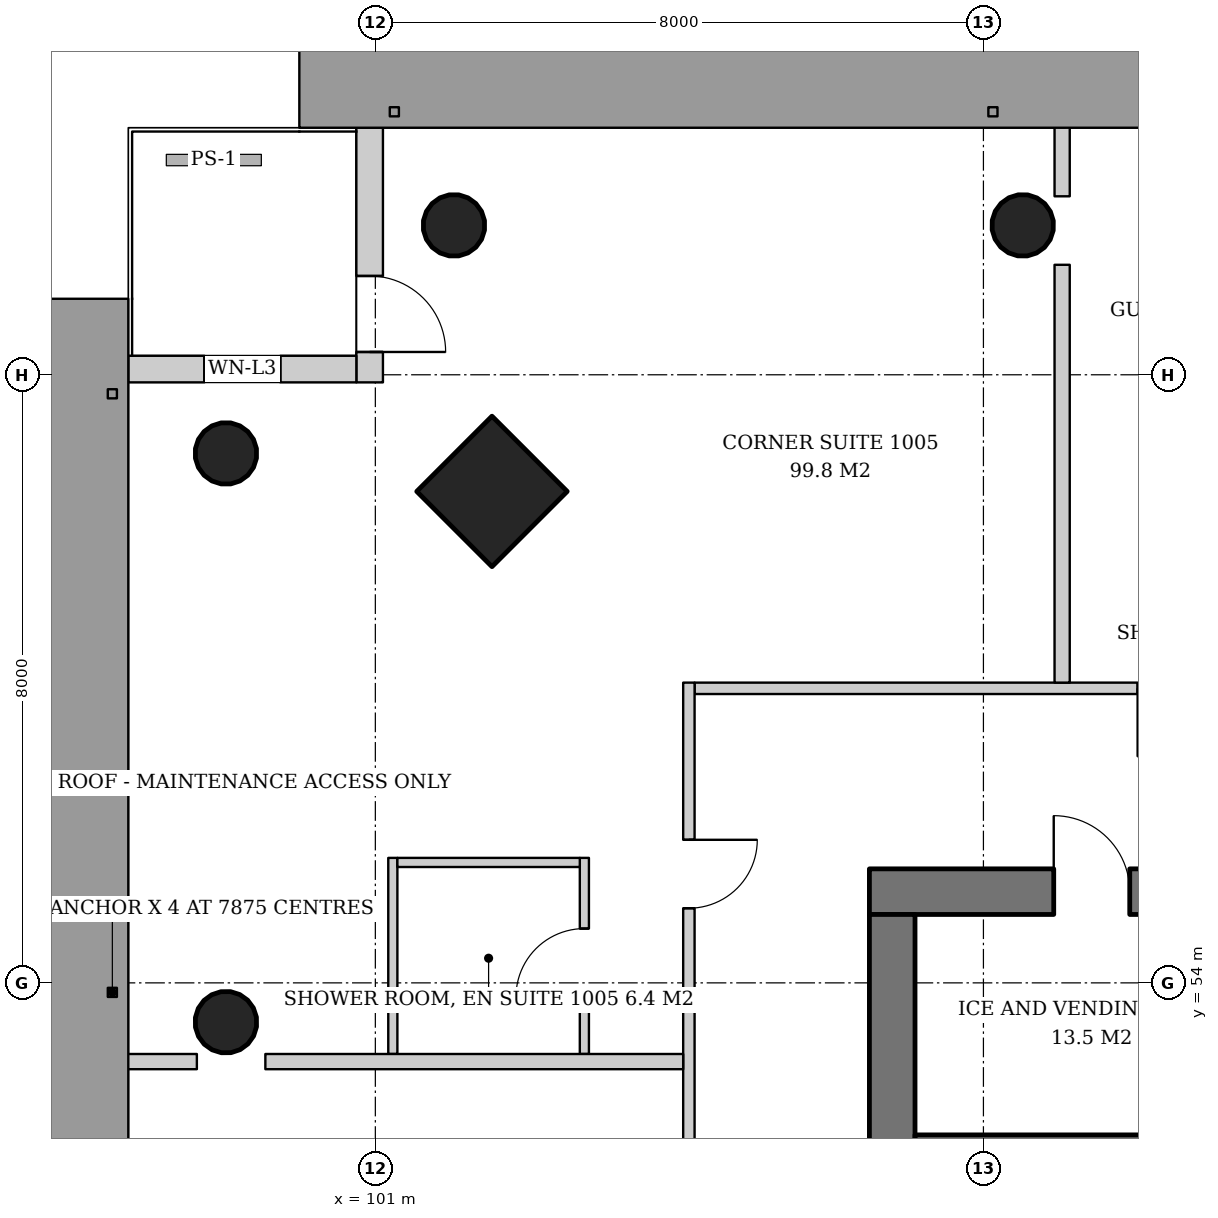
"""IFC4 building model, lengths in metres.
Left out: names, types, materials, properties, quantities, classifications, styles, units other than length and angle.
Written with IfcOpenShell. Run it as: python <this file> out.ifc"""

import sys

from ifc_helpers import new_model, si_unit, direction, frame, frame_2d, origin, origin_2d, place, context, subcontext, project, spatial, rectangle, hollow_circle, extrude, element, fill, save


model = new_model("IFC4")
c1 = context("Model", 3, precision=1e-05, world=origin(), true_north=direction((0.0, 1.0)))
c2 = subcontext(c1, "Body", "Model", "MODEL_VIEW")
j1 = project(units=[si_unit("LENGTHUNIT", "METRE"), si_unit("PLANEANGLEUNIT", "RADIAN")], contexts=[c1])
p1 = place(None, origin())
s1 = spatial("IfcSite", under=j1, at=p1, CompositionType="ELEMENT")
p2 = place(p1, origin())
s2 = spatial("IfcBuilding", under=s1, at=p2, CompositionType="ELEMENT")
p3 = place(p2, frame((0.0, 0.0, 43.8)))
s3 = spatial("IfcBuildingStorey", under=s2, at=p3, CompositionType="ELEMENT", Elevation=43.8)
p4 = place(p3, frame((102.483, 60.517, 0.0), z_axis=(0.043029647111, -0.043029647111, 0.998146732169), x_axis=(0.707106781187, 0.707106781187, 0.0)))
e1 = element("IfcColumn", 1, at=p4, inside=s3, PredefinedType="COLUMN", context=c2, shape_type="SweptSolid", body=[
    extrude(rectangle(XDim=1.4, YDim=1.4, at=origin_2d()), origin(), (0.0, 0.0, 1.0), 3.807),
])
p5 = place(p3, frame((101.983, 64.017, 0.0), z_axis=(0.043029647111, -0.043029647111, 0.998146732169), x_axis=(0.707106781187, 0.707106781187, 0.0)))
e2 = element("IfcColumn", 2, at=p5, inside=s3, PredefinedType="COLUMN", context=c2, shape_type="SweptSolid", body=[
    extrude(hollow_circle(Radius=0.406, WallThickness=0.03, at=origin_2d()), origin(), (0.0, 0.0, 1.0), 3.807),
])
p6 = place(p3, frame((109.491, 64.017, 0.0), z_axis=(0.021497706284, -0.043059584825, 0.998841188968), x_axis=(0.894693706707, 0.446680166538, 0.0)))
e3 = element("IfcColumn", 3, at=p6, inside=s3, PredefinedType="COLUMN", context=c2, shape_type="SweptSolid", body=[
    extrude(hollow_circle(Radius=0.406, WallThickness=0.03, at=origin_2d()), origin(), (0.0, 0.0, 1.0), 3.804),
])
p7 = place(p3, frame((98.983, 61.017, 0.0), z_axis=(0.043029647111, -0.043029647111, 0.998146732169), x_axis=(0.707106781187, 0.707106781187, 0.0)))
e4 = element("IfcColumn", 4, at=p7, inside=s3, PredefinedType="COLUMN", context=c2, shape_type="SweptSolid", body=[
    extrude(hollow_circle(Radius=0.406, WallThickness=0.03, at=origin_2d()), origin(), (0.0, 0.0, 1.0), 3.807),
])
p8 = place(p3, frame((98.983, 53.509, 0.0), z_axis=(0.043059584825, -0.021497706284, 0.998841188968), x_axis=(0.446680166538, 0.894693706707, 0.0)))
e5 = element("IfcColumn", 5, at=p8, inside=s3, PredefinedType="COLUMN", context=c2, shape_type="SweptSolid", body=[
    extrude(hollow_circle(Radius=0.406, WallThickness=0.03, at=origin_2d()), origin(), (0.0, 0.0, 1.0), 3.804),
])
p9 = place(p3, frame((107.5, 55.2, 0.0), z_axis=(0.0, 0.0, 1.0), x_axis=(1.0, 0.0, 0.0)))
e6 = element("IfcWall", 6, at=p9, inside=s3, PredefinedType="SHEAR", context=c2, shape_type="SweptSolid", body=[
    extrude(rectangle(XDim=19.0, YDim=0.6, at=frame_2d((9.5, 0.0))), origin(), (0.0, 0.0, 1.0), 3.8),
])
p10 = place(p9, frame((14.14, 0.0, 0.0)))
e7 = element("IfcOpeningElement", 7, at=p10, cuts=e6, PredefinedType="OPENING", context=c2, shape_type="SweptSolid", body=[
    extrude(rectangle(XDim=1.0, YDim=2.1, at=frame_2d((0.5, 1.05))), frame((0.0, 0.31, 0.0), z_axis=(0.0, -1.0, 0.0), x_axis=(1.0, 0.0, 0.0)), (0.0, 0.0, 1.0), 0.62),
])
p11 = place(p9, frame((2.425, 0.0, 0.0)))
e8 = element("IfcOpeningElement", 8, at=p11, cuts=e6, PredefinedType="OPENING", context=c2, shape_type="SweptSolid", body=[
    extrude(rectangle(XDim=1.0, YDim=2.1, at=frame_2d((0.5, 1.05))), frame((0.0, 0.31, 0.0), z_axis=(0.0, -1.0, 0.0), x_axis=(1.0, 0.0, 0.0)), (0.0, 0.0, 1.0), 0.62),
])
p12 = place(p3, frame((107.8, 37.1, 0.0), z_axis=(0.0, 0.0, 1.0), x_axis=(0.0, 1.0, 0.0)))
e9 = element("IfcWall", 9, at=p12, inside=s3, PredefinedType="SHEAR", context=c2, shape_type="SweptSolid", body=[
    extrude(rectangle(XDim=17.8, YDim=0.6, at=frame_2d((8.9, 0.0))), origin(), (0.0, 0.0, 1.0), 3.8),
])
p13 = place(p12, frame((8.0, 0.0, 0.0)))
e10 = element("IfcOpeningElement", 10, at=p13, cuts=e9, PredefinedType="OPENING", context=c2, shape_type="SweptSolid", body=[
    extrude(rectangle(XDim=1.8, YDim=2.4, at=frame_2d((0.9, 1.2))), frame((0.0, 0.31, 0.0), z_axis=(0.0, -1.0, 0.0), x_axis=(1.0, 0.0, 0.0)), (0.0, 0.0, 1.0), 0.62),
])
p14 = place(p3, frame((108.1, 51.8, 0.0), z_axis=(0.0, 0.0, 1.0), x_axis=(1.0, 0.0, 0.0)))
e11 = element("IfcWall", 11, at=p14, inside=s3, PredefinedType="SHEAR", context=c2, shape_type="SweptSolid", body=[
    extrude(rectangle(XDim=17.8, YDim=0.4, at=frame_2d((8.9, 0.0))), origin(), (0.0, 0.0, 1.0), 3.8),
])
p15 = place(p3, frame((100.925, 65.25, 0.0), z_axis=(0.0, 0.0, 1.0), x_axis=(0.0, -1.0, 0.0)))
e12 = element("IfcWall", 12, at=p15, inside=s3, PredefinedType="SOLIDWALL", context=c2, shape_type="SweptSolid", body=[
    extrude(rectangle(XDim=3.35, YDim=0.35, at=frame_2d((1.675, 0.0))), origin(), (0.0, 0.0, 1.0), 3.6),
])
p16 = place(p15, frame((1.95, 0.0, 0.0)))
e13 = element("IfcOpeningElement", 13, at=p16, cuts=e12, PredefinedType="OPENING", context=c2, shape_type="SweptSolid", body=[
    extrude(rectangle(XDim=1.0, YDim=2.4, at=frame_2d((0.5, 1.2))), frame((0.0, 0.185, 0.0), z_axis=(0.0, -1.0, 0.0), x_axis=(1.0, 0.0, 0.0)), (0.0, 0.0, 1.0), 0.37),
])
p17 = place(p3, frame((100.75, 62.075, 0.0), z_axis=(0.0, 0.0, 1.0), x_axis=(-1.0, 0.0, 0.0)))
e14 = element("IfcWall", 14, at=p17, inside=s3, PredefinedType="SOLIDWALL", context=c2, shape_type="SweptSolid", body=[
    extrude(rectangle(XDim=3.0, YDim=0.35, at=frame_2d((1.5, 0.0))), origin(), (0.0, 0.0, 1.0), 3.6),
])
p18 = place(p17, frame((1.0, 0.0, 0.9)))
e15 = element("IfcOpeningElement", 15, at=p18, cuts=e14, PredefinedType="OPENING", context=c2, shape_type="SweptSolid", body=[
    extrude(rectangle(XDim=1.0, YDim=2.4, at=frame_2d((0.5, 1.2))), frame((0.0, 0.185, 0.0), z_axis=(0.0, -1.0, 0.0), x_axis=(1.0, 0.0, 0.0)), (0.0, 0.0, 1.0), 0.37),
])
p19 = place(p3, frame((128.95, 57.875, 0.0), z_axis=(0.0, 0.0, 1.0), x_axis=(-1.0, 0.0, 0.0)))
e16 = element("IfcWall", 16, at=p19, inside=s3, PredefinedType="PARTITIONING", context=c2, shape_type="SweptSolid", body=[
    extrude(rectangle(XDim=23.75, YDim=0.15, at=frame_2d((11.875, 0.0))), origin(), (0.0, 0.0, 1.0), 2.8),
])
p20 = place(p19, frame((2.018, 0.0, 0.0)))
e17 = element("IfcOpeningElement", 17, at=p20, cuts=e16, PredefinedType="OPENING", context=c2, shape_type="SweptSolid", body=[
    extrude(rectangle(XDim=1.0, YDim=2.1, at=frame_2d((0.5, 1.05))), frame((0.0, 0.085, 0.0), z_axis=(0.0, -1.0, 0.0), x_axis=(1.0, 0.0, 0.0)), (0.0, 0.0, 1.0), 0.17),
])
p21 = place(p19, frame((7.736, 0.0, 0.0)))
e18 = element("IfcOpeningElement", 18, at=p21, cuts=e16, PredefinedType="OPENING", context=c2, shape_type="SweptSolid", body=[
    extrude(rectangle(XDim=0.9, YDim=2.1, at=frame_2d((0.45, 1.05))), frame((0.0, 0.085, 0.0), z_axis=(0.0, -1.0, 0.0), x_axis=(1.0, 0.0, 0.0)), (0.0, 0.0, 1.0), 0.17),
])
p22 = place(p19, frame((17.021, 0.0, 0.0)))
e19 = element("IfcOpeningElement", 19, at=p22, cuts=e16, PredefinedType="OPENING", context=c2, shape_type="SweptSolid", body=[
    extrude(rectangle(XDim=0.9, YDim=2.1, at=frame_2d((0.45, 1.05))), frame((0.0, 0.085, 0.0), z_axis=(0.0, -1.0, 0.0), x_axis=(1.0, 0.0, 0.0)), (0.0, 0.0, 1.0), 0.17),
])
p23 = place(p3, frame((110.036, 57.95, 0.0), z_axis=(0.0, 0.0, 1.0), x_axis=(0.0, 1.0, 0.0)))
e20 = element("IfcWall", 20, at=p23, inside=s3, PredefinedType="PARTITIONING", context=c2, shape_type="SweptSolid", body=[
    extrude(rectangle(XDim=5.497, YDim=0.2, at=frame_2d((2.749, 0.0))), origin(), (0.0, 0.0, 1.0), 3.6),
])
p24 = place(p3, frame((110.036, 64.348, 0.0), z_axis=(0.0, 0.0, 1.0), x_axis=(0.0, 1.0, 0.0)))
e21 = element("IfcWall", 21, at=p24, inside=s3, PredefinedType="PARTITIONING", context=c2, shape_type="SweptSolid", body=[
    extrude(rectangle(XDim=0.942, YDim=0.2, at=frame_2d((0.471, 0.0))), origin(), (0.0, 0.0, 1.0), 3.6),
])
p25 = place(p3, frame((103.75, 53.064, 0.0), z_axis=(0.0, 0.0, 1.0), x_axis=(0.0, 1.0, 0.0)))
e22 = element("IfcWall", 22, at=p25, inside=s3, PredefinedType="PARTITIONING", context=c2, shape_type="SweptSolid", body=[
    extrude(rectangle(XDim=2.58, YDim=0.12, at=frame_2d((1.29, 0.0))), origin(), (0.0, 0.0, 1.0), 2.8),
])
p26 = place(p25, frame((0.75, 0.0, 0.0)))
e23 = element("IfcOpeningElement", 23, at=p26, cuts=e22, PredefinedType="OPENING", context=c2, shape_type="SweptSolid", body=[
    extrude(rectangle(XDim=0.9, YDim=2.1, at=frame_2d((0.45, 1.05))), frame((0.0, 0.07, 0.0), z_axis=(0.0, -1.0, 0.0), x_axis=(1.0, 0.0, 0.0)), (0.0, 0.0, 1.0), 0.14),
])
p27 = place(p3, frame((101.23, 53.064, 0.0), z_axis=(0.0, 0.0, 1.0), x_axis=(0.0, 1.0, 0.0)))
e24 = element("IfcWall", 24, at=p27, inside=s3, PredefinedType="PARTITIONING", context=c2, shape_type="SweptSolid", body=[
    extrude(rectangle(XDim=2.58, YDim=0.12, at=frame_2d((1.29, 0.0))), origin(), (0.0, 0.0, 1.0), 2.8),
])
p28 = place(p3, frame((103.69, 55.584, 0.0), z_axis=(0.0, 0.0, 1.0), x_axis=(-1.0, 0.0, 0.0)))
e25 = element("IfcWall", 25, at=p28, inside=s3, PredefinedType="PARTITIONING", context=c2, shape_type="SweptSolid", body=[
    extrude(rectangle(XDim=2.4, YDim=0.12, at=frame_2d((1.2, 0.0))), origin(), (0.0, 0.0, 1.0), 2.847),
])
p29 = place(p3, frame((105.125, 57.95, 0.0), z_axis=(0.0, 0.0, 1.0), x_axis=(0.0, -1.0, 0.0)))
e26 = element("IfcWall", 26, at=p29, inside=s3, PredefinedType="PARTITIONING", context=c2, shape_type="SweptSolid", body=[
    extrude(rectangle(XDim=23.75, YDim=0.15, at=frame_2d((11.875, 0.0))), origin(), (0.0, 0.0, 1.0), 2.8),
])
p30 = place(p29, frame((2.068, 0.0, 0.0)))
e27 = element("IfcOpeningElement", 27, at=p30, cuts=e26, PredefinedType="OPENING", context=c2, shape_type="SweptSolid", body=[
    extrude(rectangle(XDim=0.9, YDim=2.1, at=frame_2d((0.45, 1.05))), frame((0.0, 0.085, 0.0), z_axis=(0.0, -1.0, 0.0), x_axis=(1.0, 0.0, 0.0)), (0.0, 0.0, 1.0), 0.17),
])
p31 = place(p29, frame((7.686, 0.0, 0.0)))
e28 = element("IfcOpeningElement", 28, at=p31, cuts=e26, PredefinedType="OPENING", context=c2, shape_type="SweptSolid", body=[
    extrude(rectangle(XDim=1.0, YDim=2.1, at=frame_2d((0.5, 1.05))), frame((0.0, 0.085, 0.0), z_axis=(0.0, -1.0, 0.0), x_axis=(1.0, 0.0, 0.0)), (0.0, 0.0, 1.0), 0.17),
])
p32 = place(p29, frame((12.379, 0.0, 0.0)))
e29 = element("IfcOpeningElement", 29, at=p32, cuts=e26, PredefinedType="OPENING", context=c2, shape_type="SweptSolid", body=[
    extrude(rectangle(XDim=0.9, YDim=2.1, at=frame_2d((0.45, 1.05))), frame((0.0, 0.085, 0.0), z_axis=(0.0, -1.0, 0.0), x_axis=(1.0, 0.0, 0.0)), (0.0, 0.0, 1.0), 0.17),
])
p33 = place(p29, frame((15.264, 0.0, 0.0)))
e30 = element("IfcOpeningElement", 30, at=p33, cuts=e26, PredefinedType="OPENING", context=c2, shape_type="SweptSolid", body=[
    extrude(rectangle(XDim=0.9, YDim=2.1, at=frame_2d((0.45, 1.05))), frame((0.0, 0.085, 0.0), z_axis=(0.0, -1.0, 0.0), x_axis=(1.0, 0.0, 0.0)), (0.0, 0.0, 1.0), 0.17),
])
p34 = place(p3, frame((105.05, 52.964, 0.0), z_axis=(0.0, 0.0, 1.0), x_axis=(-1.0, 0.0, 0.0)))
e31 = element("IfcWall", 31, at=p34, inside=s3, PredefinedType="PARTITIONING", context=c2, shape_type="SweptSolid", body=[
    extrude(rectangle(XDim=5.497, YDim=0.2, at=frame_2d((2.749, 0.0))), origin(), (0.0, 0.0, 1.0), 3.6),
])
p35 = place(p3, frame((98.652, 52.964, 0.0), z_axis=(0.0, 0.0, 1.0), x_axis=(-1.0, 0.0, 0.0)))
e32 = element("IfcWall", 32, at=p35, inside=s3, PredefinedType="PARTITIONING", context=c2, shape_type="SweptSolid", body=[
    extrude(rectangle(XDim=0.942, YDim=0.2, at=frame_2d((0.471, 0.0))), origin(), (0.0, 0.0, 1.0), 3.6),
])
p36 = place(p16, origin())
e33 = element("IfcDoor", 33, at=p36, inside=s3, OperationType="SINGLE_SWING_RIGHT", PredefinedType="DOOR", context=c2, shape_type="SweptSolid", body=[
    extrude(rectangle(XDim=1.0, YDim=2.4, at=frame_2d((0.5, 1.2))), frame((0.0, 0.025, 0.0), z_axis=(0.0, -1.0, 0.0), x_axis=(1.0, 0.0, 0.0)), (0.0, 0.0, 1.0), 0.05),
])
fill(e13, e33)
p37 = place(p18, origin())
e34 = element("IfcWindow", 34, at=p37, inside=s3, PartitioningType="SINGLE_PANEL", PredefinedType="WINDOW", context=c2, shape_type="SweptSolid", body=[
    extrude(rectangle(XDim=1.0, YDim=2.4, at=frame_2d((0.5, 1.2))), frame((0.0, 0.03, 0.0), z_axis=(0.0, -1.0, 0.0), x_axis=(1.0, 0.0, 0.0)), (0.0, 0.0, 1.0), 0.06),
])
fill(e15, e34)
p38 = place(p11, origin())
e35 = element("IfcDoor", 35, at=p38, inside=s3, OperationType="SINGLE_SWING_LEFT", PredefinedType="DOOR", context=c2, shape_type="SweptSolid", body=[
    extrude(rectangle(XDim=1.0, YDim=2.1, at=frame_2d((0.5, 1.05))), frame((0.0, -0.24, 0.0), z_axis=(0.0, -1.0, 0.0), x_axis=(1.0, 0.0, 0.0)), (0.0, 0.0, 1.0), 0.05),
])
fill(e8, e35)
p39 = place(p22, origin())
e36 = element("IfcDoor", 36, at=p39, inside=s3, OperationType="SINGLE_SWING_RIGHT", PredefinedType="DOOR", context=c2, shape_type="SweptSolid", body=[
    extrude(rectangle(XDim=0.9, YDim=2.1, at=frame_2d((0.45, 1.05))), frame((0.0, 0.025, 0.0), z_axis=(0.0, -1.0, 0.0), x_axis=(1.0, 0.0, 0.0)), (0.0, 0.0, 1.0), 0.05),
])
fill(e19, e36)
p40 = place(p26, origin())
e37 = element("IfcDoor", 37, at=p40, inside=s3, OperationType="SINGLE_SWING_LEFT", PredefinedType="DOOR", context=c2, shape_type="SweptSolid", body=[
    extrude(rectangle(XDim=0.9, YDim=2.1, at=frame_2d((0.45, 1.05))), frame((0.0, 0.025, 0.0), z_axis=(0.0, -1.0, 0.0), x_axis=(1.0, 0.0, 0.0)), (0.0, 0.0, 1.0), 0.05),
])
fill(e23, e37)
p41 = place(p30, origin())
e38 = element("IfcDoor", 38, at=p41, inside=s3, OperationType="SINGLE_SWING_LEFT", PredefinedType="DOOR", context=c2, shape_type="SweptSolid", body=[
    extrude(rectangle(XDim=0.9, YDim=2.1, at=frame_2d((0.45, 1.05))), frame((0.0, 0.025, 0.0), z_axis=(0.0, -1.0, 0.0), x_axis=(1.0, 0.0, 0.0)), (0.0, 0.0, 1.0), 0.05),
])
fill(e27, e38)
save(model, sys.argv[1])
